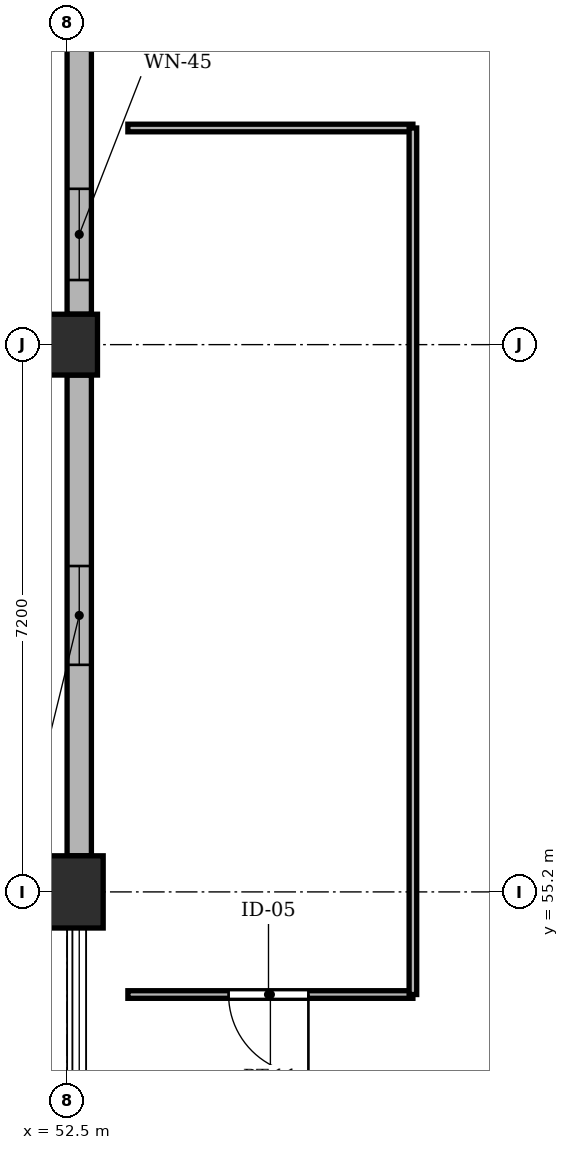
"""IFC4 building model, lengths in metres.
Left out: names, types, materials, properties, quantities, classifications, styles, units other than length and angle.
Written with IfcOpenShell. Run it as: python <this file> out.ifc"""

import sys

from ifc_helpers import new_model, si_unit, direction, frame, frame_2d, origin, origin_2d, place, context, subcontext, project, spatial, rectangle, extrude, element, fill, save


model = new_model("IFC4")
c1 = context("Model", 3, precision=1e-05, world=origin(), true_north=direction((0.0, 1.0)))
c2 = subcontext(c1, "Body", "Model", "MODEL_VIEW")
j1 = project(units=[si_unit("LENGTHUNIT", "METRE"), si_unit("PLANEANGLEUNIT", "RADIAN")], contexts=[c1])
p1 = place(None, origin())
s1 = spatial("IfcSite", under=j1, at=p1, CompositionType="ELEMENT")
p2 = place(p1, origin())
s2 = spatial("IfcBuilding", under=s1, at=p2, CompositionType="ELEMENT")
p3 = place(p2, frame((0.0, 0.0, 43.8)))
s3 = spatial("IfcBuildingStorey", under=s2, at=p3, CompositionType="ELEMENT", Elevation=43.8)
p4 = place(p3, frame((52.5, 55.2, -0.24), z_axis=(0.0, 0.0, 1.0), x_axis=(1.0, 0.0, 0.0)))
e1 = element("IfcColumn", 1, at=p4, inside=s3, PredefinedType="COLUMN", context=c2, shape_type="SweptSolid", body=[
    extrude(rectangle(XDim=0.95, YDim=0.95, at=origin_2d()), origin(), (0.0, 0.0, 1.0), 3.26),
])
p5 = place(p3, frame((52.5, 62.4, -0.24), z_axis=(0.0, 0.0, 1.0), x_axis=(1.0, 0.0, 0.0)))
e2 = element("IfcColumn", 2, at=p5, inside=s3, PredefinedType="COLUMN", context=c2, shape_type="SweptSolid", body=[
    extrude(rectangle(XDim=0.8, YDim=0.8, at=origin_2d()), origin(), (0.0, 0.0, 1.0), 3.26),
])
p6 = place(p3, frame((52.66, 68.4, 0.0), z_axis=(0.0, 0.0, 1.0), x_axis=(0.0, -1.0, 0.0)))
e3 = element("IfcWall", 3, at=p6, inside=s3, PredefinedType="SOLIDWALL", context=c2, shape_type="SweptSolid", body=[
    extrude(rectangle(XDim=5.6, YDim=0.32, at=frame_2d((2.8, 0.0))), origin(), (0.0, 0.0, 1.0), 2.53),
])
p7 = place(p6, frame((3.95, 0.0, 0.62)))
e4 = element("IfcOpeningElement", 4, at=p7, cuts=e3, PredefinedType="OPENING", context=c2, shape_type="SweptSolid", body=[
    extrude(rectangle(XDim=1.2, YDim=1.65, at=frame_2d((0.6, 0.825))), frame((0.0, 0.172, 0.0), z_axis=(0.0, -1.0, 0.0), x_axis=(1.0, 0.0, 0.0)), (0.0, 0.0, 1.0), 0.344),
])
p8 = place(p3, frame((52.66, 62.0, 0.0), z_axis=(0.0, 0.0, 1.0), x_axis=(0.0, -1.0, 0.0)))
e5 = element("IfcWall", 5, at=p8, inside=s3, PredefinedType="SOLIDWALL", context=c2, shape_type="SweptSolid", body=[
    extrude(rectangle(XDim=6.325, YDim=0.32, at=frame_2d((3.163, 0.0))), origin(), (0.0, 0.0, 1.0), 2.53),
])
p9 = place(p8, frame((2.512, 0.0, 0.62)))
e6 = element("IfcOpeningElement", 6, at=p9, cuts=e5, PredefinedType="OPENING", context=c2, shape_type="SweptSolid", body=[
    extrude(rectangle(XDim=1.3, YDim=1.8, at=frame_2d((0.65, 0.9))), frame((0.0, 0.172, 0.0), z_axis=(0.0, -1.0, 0.0), x_axis=(1.0, 0.0, 0.0)), (0.0, 0.0, 1.0), 0.344),
])
p10 = place(p3, frame((53.3, 53.85, 0.0), z_axis=(0.0, 0.0, 1.0), x_axis=(1.0, 0.0, 0.0)))
e7 = element("IfcWall", 7, at=p10, inside=s3, PredefinedType="PARTITIONING", context=c2, shape_type="SweptSolid", body=[
    extrude(rectangle(XDim=3.75, YDim=0.1, at=frame_2d((1.875, 0.0))), origin(), (0.0, 0.0, 1.0), 2.53),
])
p11 = place(p10, frame((1.325, 0.0, 0.0)))
e8 = element("IfcOpeningElement", 8, at=p11, cuts=e7, PredefinedType="OPENING", context=c2, shape_type="SweptSolid", body=[
    extrude(rectangle(XDim=1.05, YDim=2.15, at=frame_2d((0.525, 1.075))), frame((0.0, 0.062, 0.0), z_axis=(0.0, -1.0, 0.0), x_axis=(1.0, 0.0, 0.0)), (0.0, 0.0, 1.0), 0.124),
])
p12 = place(p3, frame((53.3, 65.25, 0.0), z_axis=(0.0, 0.0, 1.0), x_axis=(1.0, 0.0, 0.0)))
e9 = element("IfcWall", 9, at=p12, inside=s3, PredefinedType="PARTITIONING", context=c2, shape_type="SweptSolid", body=[
    extrude(rectangle(XDim=3.75, YDim=0.1, at=frame_2d((1.875, 0.0))), origin(), (0.0, 0.0, 1.0), 2.53),
])
p13 = place(p3, frame((57.05, 53.85, 0.0), z_axis=(0.0, 0.0, 1.0), x_axis=(0.0, 1.0, 0.0)))
e10 = element("IfcWall", 10, at=p13, inside=s3, PredefinedType="PARTITIONING", context=c2, shape_type="SweptSolid", body=[
    extrude(rectangle(XDim=11.4, YDim=0.1, at=frame_2d((5.7, 0.0))), origin(), (0.0, 0.0, 1.0), 2.53),
])
p14 = place(p7, origin())
e11 = element("IfcWindow", 11, at=p14, inside=s3, PartitioningType="SINGLE_PANEL", PredefinedType="WINDOW", context=c2, shape_type="SweptSolid", body=[
    extrude(rectangle(XDim=1.2, YDim=1.65, at=frame_2d((0.6, 0.825))), frame((0.0, 0.03, 0.0), z_axis=(0.0, -1.0, 0.0), x_axis=(1.0, 0.0, 0.0)), (0.0, 0.0, 1.0), 0.06),
])
fill(e4, e11)
p15 = place(p9, origin())
e12 = element("IfcWindow", 12, at=p15, inside=s3, PartitioningType="SINGLE_PANEL", PredefinedType="WINDOW", context=c2, shape_type="SweptSolid", body=[
    extrude(rectangle(XDim=1.3, YDim=1.8, at=frame_2d((0.65, 0.9))), frame((0.0, 0.03, 0.0), z_axis=(0.0, -1.0, 0.0), x_axis=(1.0, 0.0, 0.0)), (0.0, 0.0, 1.0), 0.06),
])
fill(e6, e12)
p16 = place(p11, frame((1.05, 0.0, 0.0), z_axis=(0.0, 0.0, 1.0), x_axis=(-1.0, 0.0, 0.0)))
e13 = element("IfcDoor", 13, at=p16, inside=s3, OperationType="SINGLE_SWING_RIGHT", PredefinedType="DOOR", context=c2, shape_type="SweptSolid", body=[
    extrude(rectangle(XDim=1.05, YDim=2.15, at=frame_2d((0.525, 1.075))), frame((0.0, 0.025, 0.0), z_axis=(0.0, -1.0, 0.0), x_axis=(1.0, 0.0, 0.0)), (0.0, 0.0, 1.0), 0.05),
])
fill(e8, e13)
save(model, sys.argv[1])
